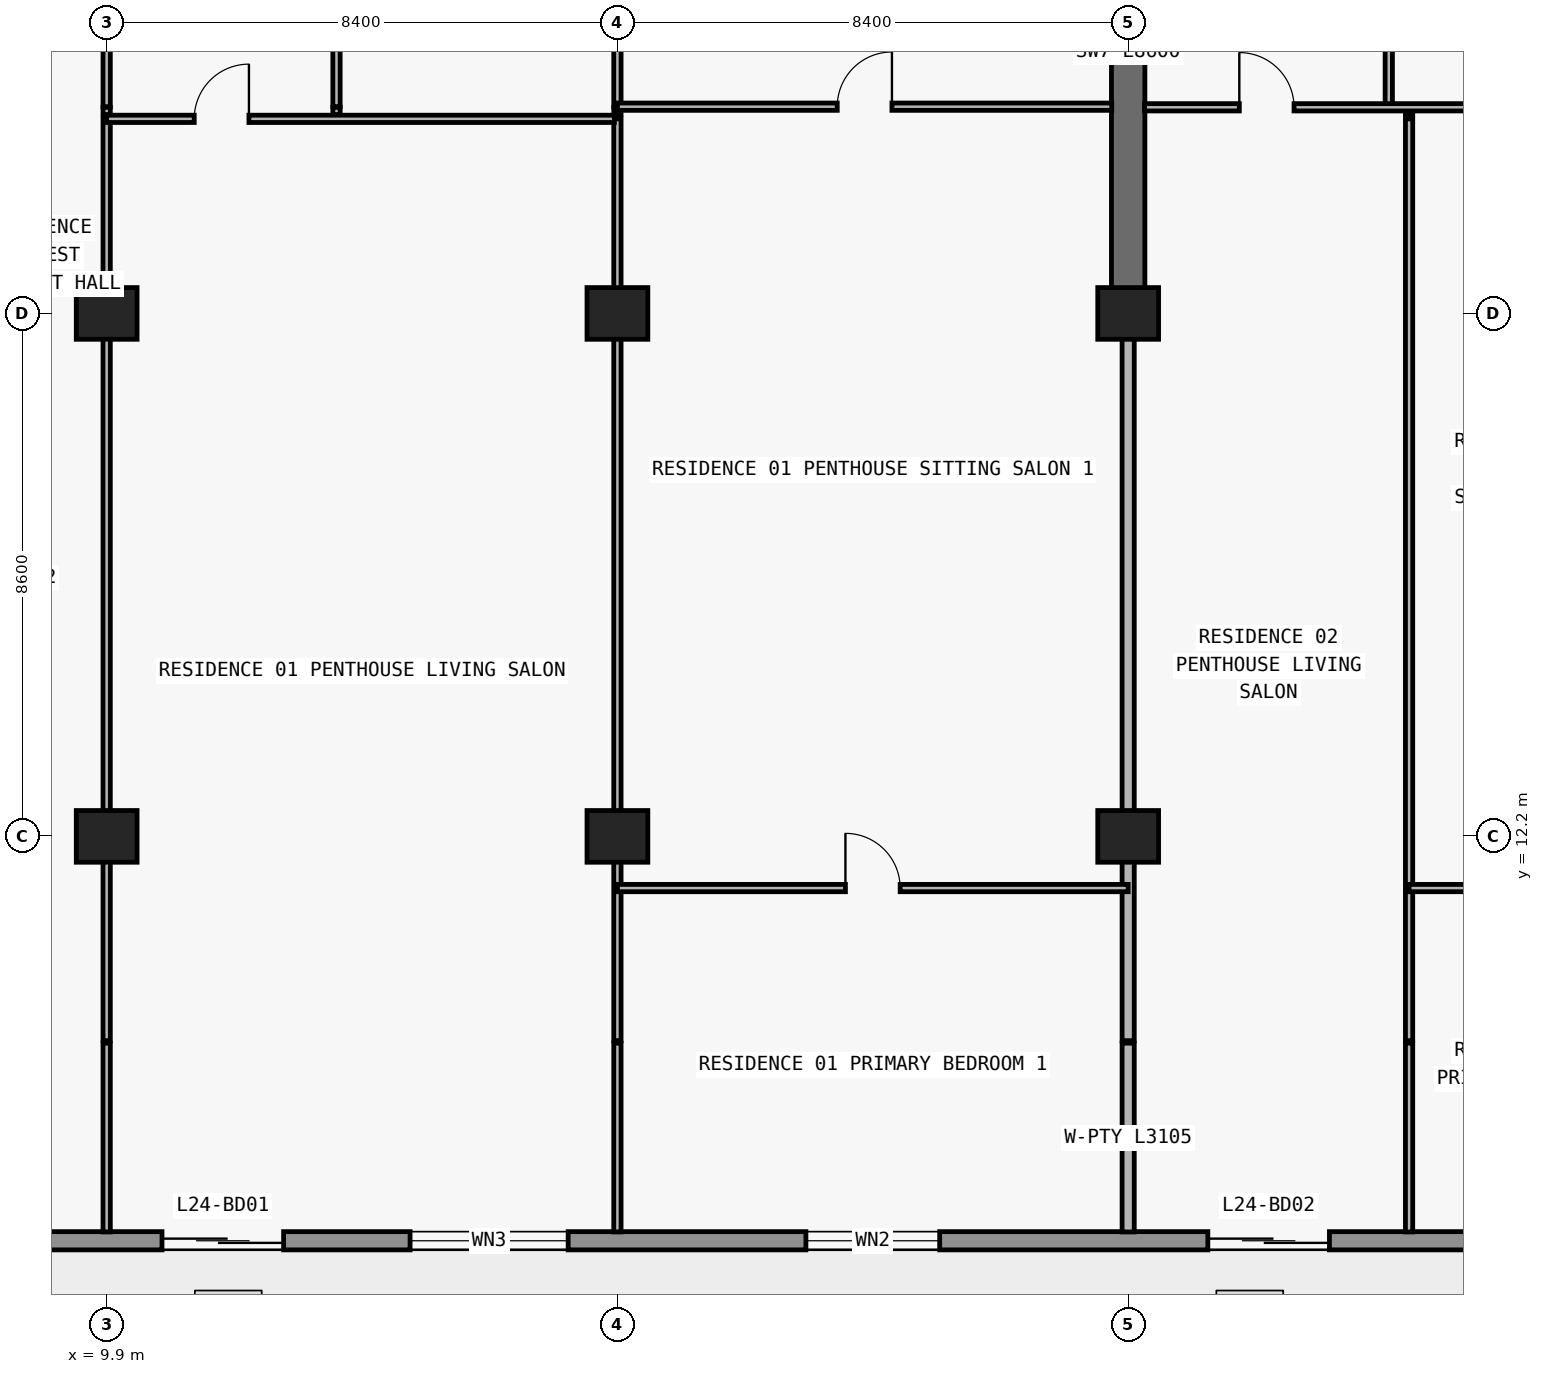
"""IFC4 building model, lengths in metres.
Left out: names, types, materials, properties, quantities, classifications, styles, units other than length and angle.
Written with IfcOpenShell. Run it as: python <this file> out.ifc"""

import sys

from ifc_helpers import new_model, si_unit, direction, frame, frame_2d, origin, origin_2d, place, context, subcontext, project, spatial, rectangle, extrude, element, fill, save


model = new_model("IFC4")
c1 = context("Model", 3, precision=1e-05, world=origin(), true_north=direction((0.0, 1.0)))
c2 = subcontext(c1, "Body", "Model", "MODEL_VIEW")
j1 = project(units=[si_unit("LENGTHUNIT", "METRE"), si_unit("PLANEANGLEUNIT", "RADIAN")], contexts=[c1])
p1 = place(None, origin())
s1 = spatial("IfcSite", under=j1, at=p1, CompositionType="ELEMENT")
p2 = place(p1, origin())
s2 = spatial("IfcBuilding", under=s1, at=p2, CompositionType="ELEMENT")
p3 = place(p2, frame((0.0, 0.0, 91.2)))
s3 = spatial("IfcBuildingStorey", under=s2, at=p3, CompositionType="ELEMENT", Elevation=91.2)
for number, where, z_axis, x_axis in (
    (1, (9.9, 12.2, 0.0), (0.0, 0.0, 1.0), (1.0, 0.0, 0.0)),
    (2, (18.3, 12.2, 0.0), (0.0, 0.0, 1.0), (1.0, 0.0, 0.0)),
    (3, (26.7, 12.2, 0.0), (0.0, 0.0, 1.0), (1.0, 0.0, 0.0)),
    (4, (9.9, 20.8, 0.0), (0.0, 0.0, 1.0), (1.0, 0.0, 0.0)),
    (5, (18.3, 20.8, 0.0), (0.0, 0.0, 1.0), (1.0, 0.0, 0.0)),
    (6, (26.7, 20.8, 0.0), (0.0, 0.0, 1.0), (1.0, 0.0, 0.0)),
):
    element("IfcColumn", number, at=place(p3, frame(where, z_axis=z_axis, x_axis=x_axis)), inside=s3, PredefinedType="COLUMN", context=c2, shape_type="SweptSolid", body=[
        extrude(rectangle(XDim=1.0, YDim=0.85, at=origin_2d()), origin(), (0.0, 0.0, 1.0), 3.05),
    ])
p4 = place(p3, frame((26.7, 20.8, 0.0), z_axis=(0.0, 0.0, 1.0), x_axis=(0.0, 1.0, 0.0)))
e7 = element("IfcWall", 7, at=p4, inside=s3, PredefinedType="SHEAR", context=c2, shape_type="SweptSolid", body=[
    extrude(rectangle(XDim=8.6, YDim=0.55, at=frame_2d((4.3, 0.0))), origin(), (0.0, 0.0, 1.0), 3.05),
])
p5 = place(p3, frame((70.1, 5.55, 0.0), z_axis=(0.0, 0.0, 1.0), x_axis=(-1.0, 0.0, 0.0)))
e8 = element("IfcWall", 8, at=p5, inside=s3, PredefinedType="STANDARD", context=c2, shape_type="SweptSolid", body=[
    extrude(rectangle(XDim=62.4, YDim=0.3, at=frame_2d((31.2, 0.0))), origin(), (0.0, 0.0, 1.0), 3.05),
])
p6 = place(p5, frame((57.29, 0.0, 0.0)))
e9 = element("IfcOpeningElement", 9, at=p6, cuts=e8, PredefinedType="OPENING", context=c2, shape_type="SweptSolid", body=[
    extrude(rectangle(XDim=2.0, YDim=2.3, at=frame_2d((1.0, 1.15))), frame((0.0, 0.16, 0.0), z_axis=(0.0, -1.0, 0.0), x_axis=(1.0, 0.0, 0.0)), (0.0, 0.0, 1.0), 0.32),
])
p7 = place(p5, frame((52.61, 0.0, 0.65)))
e10 = element("IfcOpeningElement", 10, at=p7, cuts=e8, PredefinedType="OPENING", context=c2, shape_type="SweptSolid", body=[
    extrude(rectangle(XDim=2.6, YDim=1.85, at=frame_2d((1.3, 0.925))), frame((0.0, 0.16, 0.0), z_axis=(0.0, -1.0, 0.0), x_axis=(1.0, 0.0, 0.0)), (0.0, 0.0, 1.0), 0.32),
])
p8 = place(p5, frame((46.5, 0.0, 0.85)))
e11 = element("IfcOpeningElement", 11, at=p8, cuts=e8, PredefinedType="OPENING", context=c2, shape_type="SweptSolid", body=[
    extrude(rectangle(XDim=2.2, YDim=1.55, at=frame_2d((1.1, 0.775))), frame((0.0, 0.16, 0.0), z_axis=(0.0, -1.0, 0.0), x_axis=(1.0, 0.0, 0.0)), (0.0, 0.0, 1.0), 0.32),
])
p9 = place(p5, frame((40.09, 0.0, 0.0)))
e12 = element("IfcOpeningElement", 12, at=p9, cuts=e8, PredefinedType="OPENING", context=c2, shape_type="SweptSolid", body=[
    extrude(rectangle(XDim=2.0, YDim=2.3, at=frame_2d((1.0, 1.15))), frame((0.0, 0.16, 0.0), z_axis=(0.0, -1.0, 0.0), x_axis=(1.0, 0.0, 0.0)), (0.0, 0.0, 1.0), 0.32),
])
p10 = place(p5, frame((35.99, 0.0, 0.85)))
e13 = element("IfcOpeningElement", 13, at=p10, cuts=e8, PredefinedType="OPENING", context=c2, shape_type="SweptSolid", body=[
    extrude(rectangle(XDim=1.8, YDim=1.55, at=frame_2d((0.9, 0.775))), frame((0.0, 0.16, 0.0), z_axis=(0.0, -1.0, 0.0), x_axis=(1.0, 0.0, 0.0)), (0.0, 0.0, 1.0), 0.32),
])
p11 = place(p5, frame((28.314, 0.0, 0.85)))
e14 = element("IfcOpeningElement", 14, at=p11, cuts=e8, PredefinedType="OPENING", context=c2, shape_type="SweptSolid", body=[
    extrude(rectangle(XDim=2.2, YDim=1.55, at=frame_2d((1.1, 0.775))), frame((0.0, 0.16, 0.0), z_axis=(0.0, -1.0, 0.0), x_axis=(1.0, 0.0, 0.0)), (0.0, 0.0, 1.0), 0.32),
])
p12 = place(p5, frame((24.09, 0.0, 0.0)))
e15 = element("IfcOpeningElement", 15, at=p12, cuts=e8, PredefinedType="OPENING", context=c2, shape_type="SweptSolid", body=[
    extrude(rectangle(XDim=2.0, YDim=2.3, at=frame_2d((1.0, 1.15))), frame((0.0, 0.16, 0.0), z_axis=(0.0, -1.0, 0.0), x_axis=(1.0, 0.0, 0.0)), (0.0, 0.0, 1.0), 0.32),
])
p13 = place(p5, frame((19.99, 0.0, 0.85)))
e16 = element("IfcOpeningElement", 16, at=p13, cuts=e8, PredefinedType="OPENING", context=c2, shape_type="SweptSolid", body=[
    extrude(rectangle(XDim=1.8, YDim=1.55, at=frame_2d((0.9, 0.775))), frame((0.0, 0.16, 0.0), z_axis=(0.0, -1.0, 0.0), x_axis=(1.0, 0.0, 0.0)), (0.0, 0.0, 1.0), 0.32),
])
p14 = place(p5, frame((16.09, 0.0, 0.0)))
e17 = element("IfcOpeningElement", 17, at=p14, cuts=e8, PredefinedType="OPENING", context=c2, shape_type="SweptSolid", body=[
    extrude(rectangle(XDim=2.0, YDim=2.3, at=frame_2d((1.0, 1.15))), frame((0.0, 0.16, 0.0), z_axis=(0.0, -1.0, 0.0), x_axis=(1.0, 0.0, 0.0)), (0.0, 0.0, 1.0), 0.32),
])
p15 = place(p5, frame((11.41, 0.0, 0.65)))
e18 = element("IfcOpeningElement", 18, at=p15, cuts=e8, PredefinedType="OPENING", context=c2, shape_type="SweptSolid", body=[
    extrude(rectangle(XDim=2.6, YDim=1.85, at=frame_2d((1.3, 0.925))), frame((0.0, 0.16, 0.0), z_axis=(0.0, -1.0, 0.0), x_axis=(1.0, 0.0, 0.0)), (0.0, 0.0, 1.0), 0.32),
])
p16 = place(p5, frame((5.3, 0.0, 0.85)))
e19 = element("IfcOpeningElement", 19, at=p16, cuts=e8, PredefinedType="OPENING", context=c2, shape_type="SweptSolid", body=[
    extrude(rectangle(XDim=2.2, YDim=1.55, at=frame_2d((1.1, 0.775))), frame((0.0, 0.16, 0.0), z_axis=(0.0, -1.0, 0.0), x_axis=(1.0, 0.0, 0.0)), (0.0, 0.0, 1.0), 0.32),
])
p17 = place(p3, frame((9.9, 5.695, 0.0), z_axis=(0.0, 0.0, 1.0), x_axis=(0.0, 1.0, 0.0)))
e20 = element("IfcWall", 20, at=p17, inside=s3, PredefinedType="PARTITIONING", context=c2, shape_type="SweptSolid", body=[
    extrude(rectangle(XDim=3.105, YDim=0.12, at=frame_2d((1.552, 0.0))), origin(), (0.0, 0.0, 1.0), 3.05),
])
p18 = place(p3, frame((9.9, 8.84, 0.0), z_axis=(0.0, 0.0, 1.0), x_axis=(0.0, 1.0, 0.0)))
e21 = element("IfcWall", 21, at=p18, inside=s3, PredefinedType="PARTITIONING", context=c2, shape_type="SweptSolid", body=[
    extrude(rectangle(XDim=15.16, YDim=0.12, at=frame_2d((7.58, 0.0))), origin(), (0.0, 0.0, 1.0), 2.174),
])
p19 = place(p3, frame((9.9, 24.07, 0.0), z_axis=(0.0, 0.0, 1.0), x_axis=(0.0, 1.0, 0.0)))
e22 = element("IfcWall", 22, at=p19, inside=s3, PredefinedType="PARTITIONING", context=c2, shape_type="SweptSolid", body=[
    extrude(rectangle(XDim=0.12, YDim=0.12, at=frame_2d((0.06, 0.0))), origin(), (0.0, 0.0, 1.0), 2.174),
])
p20 = place(p3, frame((9.9, 24.2, 0.0), z_axis=(0.0, 0.0, 1.0), x_axis=(0.0, 1.0, 0.0)))
e23 = element("IfcWall", 23, at=p20, inside=s3, PredefinedType="PARTITIONING", context=c2, shape_type="SweptSolid", body=[
    extrude(rectangle(XDim=5.14, YDim=0.12, at=frame_2d((2.57, 0.0))), origin(), (0.0, 0.0, 1.0), 2.174),
])
p21 = place(p20, frame((1.85, 0.0, 0.0)))
e24 = element("IfcOpeningElement", 24, at=p21, cuts=e23, PredefinedType="OPENING", context=c2, shape_type="SweptSolid", body=[
    extrude(rectangle(XDim=0.9, YDim=2.124, at=frame_2d((0.45, 1.062))), frame((0.0, 0.07, 0.0), z_axis=(0.0, -1.0, 0.0), x_axis=(1.0, 0.0, 0.0)), (0.0, 0.0, 1.0), 0.14),
])
p22 = place(p3, frame((13.68, 24.07, 0.0), z_axis=(0.0, 0.0, 1.0), x_axis=(0.0, 1.0, 0.0)))
e25 = element("IfcWall", 25, at=p22, inside=s3, PredefinedType="PARTITIONING", context=c2, shape_type="SweptSolid", body=[
    extrude(rectangle(XDim=0.12, YDim=0.12, at=frame_2d((0.06, 0.0))), origin(), (0.0, 0.0, 1.0), 3.05),
])
p23 = place(p3, frame((13.68, 24.2, 0.0), z_axis=(0.0, 0.0, 1.0), x_axis=(0.0, 1.0, 0.0)))
e26 = element("IfcWall", 26, at=p23, inside=s3, PredefinedType="PARTITIONING", context=c2, shape_type="SweptSolid", body=[
    extrude(rectangle(XDim=4.6, YDim=0.12, at=frame_2d((2.3, 0.0))), origin(), (0.0, 0.0, 1.0), 3.05),
])
p24 = place(p23, frame((1.85, 0.0, 0.0)))
e27 = element("IfcOpeningElement", 27, at=p24, cuts=e26, PredefinedType="OPENING", context=c2, shape_type="SweptSolid", body=[
    extrude(rectangle(XDim=0.9, YDim=2.15, at=frame_2d((0.45, 1.075))), frame((0.0, 0.07, 0.0), z_axis=(0.0, -1.0, 0.0), x_axis=(1.0, 0.0, 0.0)), (0.0, 0.0, 1.0), 0.14),
])
p25 = place(p3, frame((18.3, 5.695, 0.0), z_axis=(0.0, 0.0, 1.0), x_axis=(0.0, 1.0, 0.0)))
e28 = element("IfcWall", 28, at=p25, inside=s3, PredefinedType="PARTITIONING", context=c2, shape_type="SweptSolid", body=[
    extrude(rectangle(XDim=3.105, YDim=0.12, at=frame_2d((1.552, 0.0))), origin(), (0.0, 0.0, 1.0), 3.05),
])
p26 = place(p3, frame((18.3, 8.84, 0.0), z_axis=(0.0, 0.0, 1.0), x_axis=(0.0, 1.0, 0.0)))
e29 = element("IfcWall", 29, at=p26, inside=s3, PredefinedType="PARTITIONING", context=c2, shape_type="SweptSolid", body=[
    extrude(rectangle(XDim=15.16, YDim=0.12, at=frame_2d((7.58, 0.0))), origin(), (0.0, 0.0, 1.0), 2.174),
])
p27 = place(p3, frame((18.3, 24.07, 0.0), z_axis=(0.0, 0.0, 1.0), x_axis=(0.0, 1.0, 0.0)))
e30 = element("IfcWall", 30, at=p27, inside=s3, PredefinedType="PARTITIONING", context=c2, shape_type="SweptSolid", body=[
    extrude(rectangle(XDim=0.12, YDim=0.12, at=frame_2d((0.06, 0.0))), origin(), (0.0, 0.0, 1.0), 2.174),
])
p28 = place(p3, frame((18.3, 24.2, 0.0), z_axis=(0.0, 0.0, 1.0), x_axis=(0.0, 1.0, 0.0)))
e31 = element("IfcWall", 31, at=p28, inside=s3, PredefinedType="PARTITIONING", context=c2, shape_type="SweptSolid", body=[
    extrude(rectangle(XDim=5.14, YDim=0.12, at=frame_2d((2.57, 0.0))), origin(), (0.0, 0.0, 1.0), 2.174),
])
p29 = place(p28, frame((1.75, 0.0, 0.0)))
e32 = element("IfcOpeningElement", 32, at=p29, cuts=e31, PredefinedType="OPENING", context=c2, shape_type="SweptSolid", body=[
    extrude(rectangle(XDim=0.9, YDim=2.124, at=frame_2d((0.45, 1.062))), frame((0.0, 0.07, 0.0), z_axis=(0.0, -1.0, 0.0), x_axis=(1.0, 0.0, 0.0)), (0.0, 0.0, 1.0), 0.14),
])
p30 = place(p3, frame((26.7, 5.695, 0.0), z_axis=(0.0, 0.0, 1.0), x_axis=(0.0, 1.0, 0.0)))
e33 = element("IfcWall", 33, at=p30, inside=s3, PredefinedType="PARTITIONING", context=c2, shape_type="SweptSolid", body=[
    extrude(rectangle(XDim=3.105, YDim=0.2, at=frame_2d((1.552, 0.0))), origin(), (0.0, 0.0, 1.0), 3.05),
])
p31 = place(p3, frame((26.7, 8.84, 0.0), z_axis=(0.0, 0.0, 1.0), x_axis=(0.0, 1.0, 0.0)))
e34 = element("IfcWall", 34, at=p31, inside=s3, PredefinedType="PARTITIONING", context=c2, shape_type="SweptSolid", body=[
    extrude(rectangle(XDim=11.955, YDim=0.2, at=frame_2d((5.978, 0.0))), origin(), (0.0, 0.0, 1.0), 2.174),
])
p32 = place(p3, frame((30.986, 24.2, 0.0), z_axis=(0.0, 0.0, 1.0), x_axis=(0.0, 1.0, 0.0)))
e35 = element("IfcWall", 35, at=p32, inside=s3, PredefinedType="PARTITIONING", context=c2, shape_type="SweptSolid", body=[
    extrude(rectangle(XDim=5.14, YDim=0.12, at=frame_2d((2.57, 0.0))), origin(), (0.0, 0.0, 1.0), 3.05),
])
p33 = place(p32, frame((2.12, 0.0, 0.0)))
e36 = element("IfcOpeningElement", 36, at=p33, cuts=e35, PredefinedType="OPENING", context=c2, shape_type="SweptSolid", body=[
    extrude(rectangle(XDim=0.9, YDim=2.15, at=frame_2d((0.45, 1.075))), frame((0.0, 0.07, 0.0), z_axis=(0.0, -1.0, 0.0), x_axis=(1.0, 0.0, 0.0)), (0.0, 0.0, 1.0), 0.14),
])
p34 = place(p3, frame((31.32, 5.695, 0.0), z_axis=(0.0, 0.0, 1.0), x_axis=(0.0, 1.0, 0.0)))
e37 = element("IfcWall", 37, at=p34, inside=s3, PredefinedType="PARTITIONING", context=c2, shape_type="SweptSolid", body=[
    extrude(rectangle(XDim=3.105, YDim=0.12, at=frame_2d((1.552, 0.0))), origin(), (0.0, 0.0, 1.0), 3.05),
])
p35 = place(p3, frame((31.32, 8.84, 0.0), z_axis=(0.0, 0.0, 1.0), x_axis=(0.0, 1.0, 0.0)))
e38 = element("IfcWall", 38, at=p35, inside=s3, PredefinedType="PARTITIONING", context=c2, shape_type="SweptSolid", body=[
    extrude(rectangle(XDim=15.16, YDim=0.12, at=frame_2d((7.58, 0.0))), origin(), (0.0, 0.0, 1.0), 3.05),
])
p36 = place(p3, frame((31.32, 24.07, 0.0), z_axis=(0.0, 0.0, 1.0), x_axis=(0.0, 1.0, 0.0)))
e39 = element("IfcWall", 39, at=p36, inside=s3, PredefinedType="PARTITIONING", context=c2, shape_type="SweptSolid", body=[
    extrude(rectangle(XDim=0.12, YDim=0.12, at=frame_2d((0.06, 0.0))), origin(), (0.0, 0.0, 1.0), 3.05),
])
p37 = place(p3, frame((18.3, 11.35, 0.0), z_axis=(0.0, 0.0, 1.0), x_axis=(1.0, 0.0, 0.0)))
e40 = element("IfcWall", 40, at=p37, inside=s3, PredefinedType="PARTITIONING", context=c2, shape_type="SweptSolid", body=[
    extrude(rectangle(XDim=8.4, YDim=0.12, at=frame_2d((4.2, 0.0))), origin(), (0.0, 0.0, 1.0), 3.05),
])
p38 = place(p37, frame((3.75, 0.0, 0.0)))
e41 = element("IfcOpeningElement", 41, at=p38, cuts=e40, PredefinedType="OPENING", context=c2, shape_type="SweptSolid", body=[
    extrude(rectangle(XDim=0.9, YDim=2.15, at=frame_2d((0.45, 1.075))), frame((0.0, 0.07, 0.0), z_axis=(0.0, -1.0, 0.0), x_axis=(1.0, 0.0, 0.0)), (0.0, 0.0, 1.0), 0.14),
])
p39 = place(p3, frame((31.32, 11.35, 0.0), z_axis=(0.0, 0.0, 1.0), x_axis=(1.0, 0.0, 0.0)))
e42 = element("IfcWall", 42, at=p39, inside=s3, PredefinedType="PARTITIONING", context=c2, shape_type="SweptSolid", body=[
    extrude(rectangle(XDim=3.78, YDim=0.12, at=frame_2d((1.89, 0.0))), origin(), (0.0, 0.0, 1.0), 3.05),
])
p40 = place(p39, frame((1.44, 0.0, 0.0)))
e43 = element("IfcOpeningElement", 43, at=p40, cuts=e42, PredefinedType="OPENING", context=c2, shape_type="SweptSolid", body=[
    extrude(rectangle(XDim=0.9, YDim=2.15, at=frame_2d((0.45, 1.075))), frame((0.0, 0.07, 0.0), z_axis=(0.0, -1.0, 0.0), x_axis=(1.0, 0.0, 0.0)), (0.0, 0.0, 1.0), 0.14),
])
p41 = place(p3, frame((9.9, 24.0, 0.0), z_axis=(0.0, 0.0, 1.0), x_axis=(1.0, 0.0, 0.0)))
e44 = element("IfcWall", 44, at=p41, inside=s3, PredefinedType="PARTITIONING", context=c2, shape_type="SweptSolid", body=[
    extrude(rectangle(XDim=8.35, YDim=0.12, at=frame_2d((4.175, 0.0))), origin(), (0.0, 0.0, 1.0), 3.05),
])
p42 = place(p41, frame((1.44, 0.0, 0.0)))
e45 = element("IfcOpeningElement", 45, at=p42, cuts=e44, PredefinedType="OPENING", context=c2, shape_type="SweptSolid", body=[
    extrude(rectangle(XDim=0.9, YDim=2.15, at=frame_2d((0.45, 1.075))), frame((0.0, 0.07, 0.0), z_axis=(0.0, -1.0, 0.0), x_axis=(1.0, 0.0, 0.0)), (0.0, 0.0, 1.0), 0.14),
])
p43 = place(p3, frame((26.97, 24.19, 0.0), z_axis=(0.0, 0.0, 1.0), x_axis=(1.0, 0.0, 0.0)))
e46 = element("IfcWall", 46, at=p43, inside=s3, PredefinedType="PARTITIONING", context=c2, shape_type="SweptSolid", body=[
    extrude(rectangle(XDim=8.13, YDim=0.12, at=frame_2d((4.065, 0.0))), origin(), (0.0, 0.0, 1.0), 3.05),
])
p44 = place(p43, frame((1.558, 0.0, 0.0)))
e47 = element("IfcOpeningElement", 47, at=p44, cuts=e46, PredefinedType="OPENING", context=c2, shape_type="SweptSolid", body=[
    extrude(rectangle(XDim=0.9, YDim=2.15, at=frame_2d((0.45, 1.075))), frame((0.0, 0.07, 0.0), z_axis=(0.0, -1.0, 0.0), x_axis=(1.0, 0.0, 0.0)), (0.0, 0.0, 1.0), 0.14),
])
p45 = place(p43, frame((5.79, 0.0, 0.0)))
e48 = element("IfcOpeningElement", 48, at=p45, cuts=e46, PredefinedType="OPENING", context=c2, shape_type="SweptSolid", body=[
    extrude(rectangle(XDim=0.9, YDim=2.15, at=frame_2d((0.45, 1.075))), frame((0.0, 0.07, 0.0), z_axis=(0.0, -1.0, 0.0), x_axis=(1.0, 0.0, 0.0)), (0.0, 0.0, 1.0), 0.14),
])
p46 = place(p3, frame((18.3, 24.2, 0.0), z_axis=(0.0, 0.0, 1.0), x_axis=(1.0, 0.0, 0.0)))
e49 = element("IfcWall", 49, at=p46, inside=s3, PredefinedType="PARTITIONING", context=c2, shape_type="SweptSolid", body=[
    extrude(rectangle(XDim=8.13, YDim=0.12, at=frame_2d((4.065, 0.0))), origin(), (0.0, 0.0, 1.0), 3.05),
])
p47 = place(p46, frame((3.615, 0.0, 0.0)))
e50 = element("IfcOpeningElement", 50, at=p47, cuts=e49, PredefinedType="OPENING", context=c2, shape_type="SweptSolid", body=[
    extrude(rectangle(XDim=0.9, YDim=2.15, at=frame_2d((0.45, 1.075))), frame((0.0, 0.07, 0.0), z_axis=(0.0, -1.0, 0.0), x_axis=(1.0, 0.0, 0.0)), (0.0, 0.0, 1.0), 0.14),
])
p48 = place(p6, origin())
e51 = element("IfcDoor", 51, at=p48, inside=s3, OperationType="DOUBLE_DOOR_SLIDING", PredefinedType="DOOR", context=c2, shape_type="SweptSolid", body=[
    extrude(rectangle(XDim=2.0, YDim=2.3, at=frame_2d((1.0, 1.15))), frame((0.0, 0.025, 0.0), z_axis=(0.0, -1.0, 0.0), x_axis=(1.0, 0.0, 0.0)), (0.0, 0.0, 1.0), 0.05),
])
fill(e9, e51)
p49 = place(p7, origin())
e52 = element("IfcWindow", 52, at=p49, inside=s3, PartitioningType="SINGLE_PANEL", PredefinedType="WINDOW", context=c2, shape_type="SweptSolid", body=[
    extrude(rectangle(XDim=2.6, YDim=1.85, at=frame_2d((1.3, 0.925))), frame((0.0, 0.03, 0.0), z_axis=(0.0, -1.0, 0.0), x_axis=(1.0, 0.0, 0.0)), (0.0, 0.0, 1.0), 0.06),
])
fill(e10, e52)
p50 = place(p8, origin())
e53 = element("IfcWindow", 53, at=p50, inside=s3, PartitioningType="SINGLE_PANEL", PredefinedType="WINDOW", context=c2, shape_type="SweptSolid", body=[
    extrude(rectangle(XDim=2.2, YDim=1.55, at=frame_2d((1.1, 0.775))), frame((0.0, 0.03, 0.0), z_axis=(0.0, -1.0, 0.0), x_axis=(1.0, 0.0, 0.0)), (0.0, 0.0, 1.0), 0.06),
])
fill(e11, e53)
p51 = place(p9, origin())
e54 = element("IfcDoor", 54, at=p51, inside=s3, OperationType="DOUBLE_DOOR_SLIDING", PredefinedType="DOOR", context=c2, shape_type="SweptSolid", body=[
    extrude(rectangle(XDim=2.0, YDim=2.3, at=frame_2d((1.0, 1.15))), frame((0.0, 0.025, 0.0), z_axis=(0.0, -1.0, 0.0), x_axis=(1.0, 0.0, 0.0)), (0.0, 0.0, 1.0), 0.05),
])
fill(e12, e54)
p52 = place(p42, origin())
e55 = element("IfcDoor", 55, at=p52, inside=s3, OperationType="SINGLE_SWING_RIGHT", PredefinedType="DOOR", context=c2, shape_type="SweptSolid", body=[
    extrude(rectangle(XDim=0.9, YDim=2.15, at=frame_2d((0.45, 1.075))), frame((0.0, 0.025, 0.0), z_axis=(0.0, -1.0, 0.0), x_axis=(1.0, 0.0, 0.0)), (0.0, 0.0, 1.0), 0.05),
])
fill(e45, e55)
p53 = place(p47, origin())
e56 = element("IfcDoor", 56, at=p53, inside=s3, OperationType="SINGLE_SWING_RIGHT", PredefinedType="DOOR", context=c2, shape_type="SweptSolid", body=[
    extrude(rectangle(XDim=0.9, YDim=2.15, at=frame_2d((0.45, 1.075))), frame((0.0, 0.025, 0.0), z_axis=(0.0, -1.0, 0.0), x_axis=(1.0, 0.0, 0.0)), (0.0, 0.0, 1.0), 0.05),
])
fill(e50, e56)
p54 = place(p38, origin())
e57 = element("IfcDoor", 57, at=p54, inside=s3, OperationType="SINGLE_SWING_LEFT", PredefinedType="DOOR", context=c2, shape_type="SweptSolid", body=[
    extrude(rectangle(XDim=0.9, YDim=2.15, at=frame_2d((0.45, 1.075))), frame((0.0, 0.025, 0.0), z_axis=(0.0, -1.0, 0.0), x_axis=(1.0, 0.0, 0.0)), (0.0, 0.0, 1.0), 0.05),
])
fill(e41, e57)
p55 = place(p44, origin())
e58 = element("IfcDoor", 58, at=p55, inside=s3, OperationType="SINGLE_SWING_LEFT", PredefinedType="DOOR", context=c2, shape_type="SweptSolid", body=[
    extrude(rectangle(XDim=0.9, YDim=2.15, at=frame_2d((0.45, 1.075))), frame((0.0, 0.025, 0.0), z_axis=(0.0, -1.0, 0.0), x_axis=(1.0, 0.0, 0.0)), (0.0, 0.0, 1.0), 0.05),
])
fill(e47, e58)
save(model, sys.argv[1])
